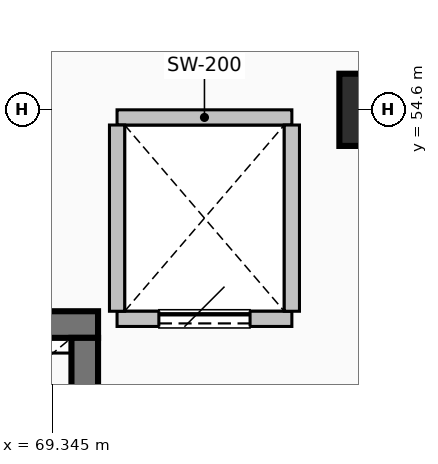
"""IFC4 building model, lengths in metres.
Left out: names, types, materials, properties, quantities, classifications, styles, units other than length and angle.
Written with IfcOpenShell. Run it as: python <this file> out.ifc"""

import sys

from ifc_helpers import new_model, si_unit, direction, frame, frame_2d, origin, origin_2d, place, context, subcontext, project, spatial, rectangle, extrude, element, fill, save


model = new_model("IFC4")
c1 = context("Model", 3, precision=1e-05, world=origin(), true_north=direction((0.0, 1.0)))
c2 = subcontext(c1, "Body", "Model", "MODEL_VIEW")
j1 = project(units=[si_unit("LENGTHUNIT", "METRE"), si_unit("PLANEANGLEUNIT", "RADIAN")], contexts=[c1])
p1 = place(None, origin())
s1 = spatial("IfcSite", under=j1, at=p1, CompositionType="ELEMENT")
p2 = place(p1, origin())
s2 = spatial("IfcBuilding", under=s1, at=p2, CompositionType="ELEMENT")
p3 = place(p2, frame((0.0, 0.0, -4.8)))
s3 = spatial("IfcBuildingStorey", under=s2, at=p3, CompositionType="ELEMENT", Elevation=-4.8)
p4 = place(p3, frame((73.6, 54.6, 0.0), z_axis=(0.0, 0.0, 1.0), x_axis=(1.0, 0.0, 0.0)))
e1 = element("IfcColumn", 1, at=p4, inside=s3, PredefinedType="COLUMN", context=c2, shape_type="SweptSolid", body=[
    extrude(rectangle(XDim=0.95, YDim=0.95, at=origin_2d()), origin(), (0.0, 0.0, 1.0), 4.8),
])
p5 = place(p3, frame((69.95, 51.775, 0.0), z_axis=(0.0, 0.0, 1.0), x_axis=(-1.0, 0.0, 0.0)))
e2 = element("IfcWall", 2, at=p5, inside=s3, PredefinedType="SHEAR", context=c2, shape_type="SweptSolid", body=[
    extrude(rectangle(XDim=8.5, YDim=0.35, at=frame_2d((4.25, 0.0))), origin(), (0.0, 0.0, 1.0), 4.48),
])
p6 = place(p3, frame((69.775, 51.6, 0.0), z_axis=(0.0, 0.0, 1.0), x_axis=(0.0, -1.0, 0.0)))
e3 = element("IfcWall", 3, at=p6, inside=s3, PredefinedType="SHEAR", context=c2, shape_type="SweptSolid", body=[
    extrude(rectangle(XDim=3.8, YDim=0.35, at=frame_2d((1.9, 0.0))), origin(), (0.0, 0.0, 1.0), 4.48),
])
p7 = place(p3, frame((70.2, 51.85, 0.0), z_axis=(0.0, 0.0, 1.0), x_axis=(1.0, 0.0, 0.0)))
e4 = element("IfcWall", 4, at=p7, inside=s3, PredefinedType="PARTITIONING", context=c2, shape_type="SweptSolid", body=[
    extrude(rectangle(XDim=2.3, YDim=0.2, at=frame_2d((1.15, 0.0))), origin(), (0.0, 0.0, 1.0), 4.472),
])
p8 = place(p7, frame((0.55, 0.0, 0.0)))
e5 = element("IfcOpeningElement", 5, at=p8, cuts=e4, PredefinedType="OPENING", context=c2, shape_type="SweptSolid", body=[
    extrude(rectangle(XDim=1.2, YDim=2.15, at=frame_2d((0.6, 1.075))), frame((0.0, 0.11, 0.0), z_axis=(0.0, -1.0, 0.0), x_axis=(1.0, 0.0, 0.0)), (0.0, 0.0, 1.0), 0.22),
])
p9 = place(p3, frame((72.5, 54.5, 0.0), z_axis=(0.0, 0.0, 1.0), x_axis=(-1.0, 0.0, 0.0)))
e6 = element("IfcWall", 6, at=p9, inside=s3, PredefinedType="PARTITIONING", context=c2, shape_type="SweptSolid", body=[
    extrude(rectangle(XDim=2.3, YDim=0.2, at=frame_2d((1.15, 0.0))), origin(), (0.0, 0.0, 1.0), 3.722),
])
for number, where, z_axis, x_axis in (
    (7, (70.2, 51.95, 0.0), (0.0, 0.0, 1.0), (0.0, 1.0, 0.0)),
    (8, (72.5, 54.4, 0.0), (0.0, 0.0, 1.0), (0.0, -1.0, 0.0)),
):
    element("IfcWall", number, at=place(p3, frame(where, z_axis=z_axis, x_axis=x_axis)), inside=s3, PredefinedType="PARTITIONING", context=c2, shape_type="SweptSolid", body=[
        extrude(rectangle(XDim=2.45, YDim=0.2, at=frame_2d((1.225, 0.0))), origin(), (0.0, 0.0, 1.0), 4.472),
    ])
p10 = place(p8, origin())
e9 = element("IfcDoor", 9, at=p10, inside=s3, OperationType="SLIDING_TO_LEFT", PredefinedType="DOOR", context=c2, shape_type="SweptSolid", body=[
    extrude(rectangle(XDim=1.2, YDim=2.15, at=frame_2d((0.6, 1.075))), frame((0.0, 0.025, 0.0), z_axis=(0.0, -1.0, 0.0), x_axis=(1.0, 0.0, 0.0)), (0.0, 0.0, 1.0), 0.05),
])
fill(e5, e9)
save(model, sys.argv[1])
